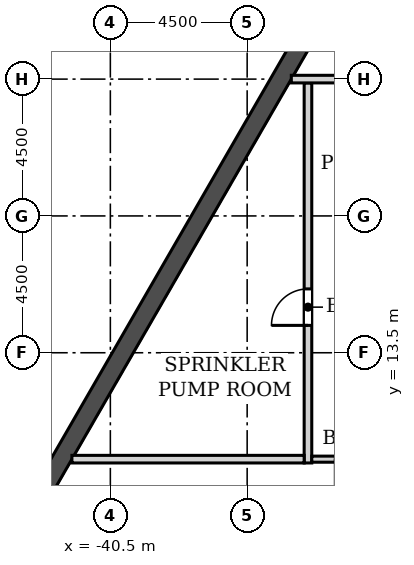
"""IFC4 building model, lengths in metres.
Left out: names, types, materials, properties, quantities, classifications, styles, units other than length and angle.
Written with IfcOpenShell. Run it as: python <this file> out.ifc"""

import sys

from ifc_helpers import new_model, si_unit, direction, frame, frame_2d, origin, place, context, subcontext, project, spatial, rectangle, extrude, element, fill, save


model = new_model("IFC4")
c1 = context("Model", 3, precision=1e-05, world=origin(), true_north=direction((0.0, 1.0)))
c2 = subcontext(c1, "Body", "Model", "MODEL_VIEW")
j1 = project(units=[si_unit("LENGTHUNIT", "METRE"), si_unit("PLANEANGLEUNIT", "RADIAN")], contexts=[c1])
p1 = place(None, origin())
s1 = spatial("IfcSite", under=j1, at=p1, CompositionType="ELEMENT")
p2 = place(p1, origin())
s2 = spatial("IfcBuilding", under=s1, at=p2, CompositionType="ELEMENT")
p3 = place(p2, frame((0.0, 0.0, -14.0)))
s3 = spatial("IfcBuildingStorey", under=s2, at=p3, CompositionType="ELEMENT", Elevation=-14.0)
p4 = place(p3, frame((-4.856, 74.528, -0.4), z_axis=(0.0, 0.0, 1.0), x_axis=(-0.499999312333, -0.866025800809, 0.0)))
e1 = element("IfcWall", 1, at=p4, inside=s3, PredefinedType="SOLIDWALL", context=c2, shape_type="SweptSolid", body=[
    extrude(rectangle(XDim=76.231, YDim=0.6, at=frame_2d((38.115, 0.0))), origin(), (0.0, 0.0, 1.0), 6.4),
])
p5 = place(p3, frame((-34.0, 9.875, 0.0), z_axis=(0.0, 0.0, 1.0), x_axis=(0.0, 1.0, 0.0)))
e2 = element("IfcWall", 2, at=p5, inside=s3, PredefinedType="SOLIDWALL", context=c2, shape_type="SweptSolid", body=[
    extrude(rectangle(XDim=12.5, YDim=0.25, at=frame_2d((6.25, 0.0))), origin(), (0.0, 0.0, 1.0), 5.65),
])
p6 = place(p5, frame((4.525, 0.0, 0.0)))
e3 = element("IfcOpeningElement", 3, at=p6, cuts=e2, PredefinedType="OPENING", context=c2, shape_type="SweptSolid", body=[
    extrude(rectangle(XDim=1.2, YDim=2.1, at=frame_2d((0.6, 1.05))), frame((0.0, 0.135, 0.0), z_axis=(0.0, -1.0, 0.0), x_axis=(1.0, 0.0, 0.0)), (0.0, 0.0, 1.0), 0.27),
])
p7 = place(p3, frame((-41.765, 10.0, 0.0), z_axis=(0.0, 0.0, 1.0), x_axis=(1.0, 0.0, 0.0)))
e4 = element("IfcWall", 4, at=p7, inside=s3, PredefinedType="SOLIDWALL", context=c2, shape_type="SweptSolid", body=[
    extrude(rectangle(XDim=7.64, YDim=0.25, at=frame_2d((3.82, 0.0))), origin(), (0.0, 0.0, 1.0), 5.65),
])
p8 = place(p3, frame((-31.025, 10.0, 0.0), z_axis=(0.0, 0.0, 1.0), x_axis=(-1.0, 0.0, 0.0)))
e5 = element("IfcWall", 5, at=p8, inside=s3, PredefinedType="PARTITIONING", context=c2, shape_type="SweptSolid", body=[
    extrude(rectangle(XDim=2.85, YDim=0.2, at=frame_2d((1.425, 0.0))), origin(), (0.0, 0.0, 1.0), 5.65),
])
p9 = place(p8, frame((0.875, 0.0, 0.0)))
e6 = element("IfcOpeningElement", 6, at=p9, cuts=e5, PredefinedType="OPENING", context=c2, shape_type="SweptSolid", body=[
    extrude(rectangle(XDim=1.2, YDim=2.1, at=frame_2d((0.6, 1.05))), frame((0.0, 0.11, 0.0), z_axis=(0.0, -1.0, 0.0), x_axis=(1.0, 0.0, 0.0)), (0.0, 0.0, 1.0), 0.22),
])
p10 = place(p3, frame((-34.548, 22.5, 0.0), z_axis=(0.0, 0.0, 1.0), x_axis=(1.0, 0.0, 0.0)))
e7 = element("IfcWall", 7, at=p10, inside=s3, PredefinedType="SOLIDWALL", context=c2, shape_type="SweptSolid", body=[
    extrude(rectangle(XDim=26.273, YDim=0.25, at=frame_2d((13.136, 0.0))), origin(), (0.0, 0.0, 1.0), 5.65),
])
p11 = place(p10, frame((13.348, 0.0, 0.0)))
e8 = element("IfcOpeningElement", 8, at=p11, cuts=e7, PredefinedType="OPENING", context=c2, shape_type="SweptSolid", body=[
    extrude(rectangle(XDim=2.4, YDim=2.4, at=frame_2d((1.2, 1.2))), frame((0.0, 0.135, 0.0), z_axis=(0.0, -1.0, 0.0), x_axis=(1.0, 0.0, 0.0)), (0.0, 0.0, 1.0), 0.27),
])
p12 = place(p6, origin())
e9 = element("IfcDoor", 9, at=p12, inside=s3, OperationType="SINGLE_SWING_LEFT", PredefinedType="DOOR", context=c2, shape_type="SweptSolid", body=[
    extrude(rectangle(XDim=1.2, YDim=2.1, at=frame_2d((0.6, 1.05))), frame((0.0, 0.025, 0.0), z_axis=(0.0, -1.0, 0.0), x_axis=(1.0, 0.0, 0.0)), (0.0, 0.0, 1.0), 0.05),
])
fill(e3, e9)
save(model, sys.argv[1])
